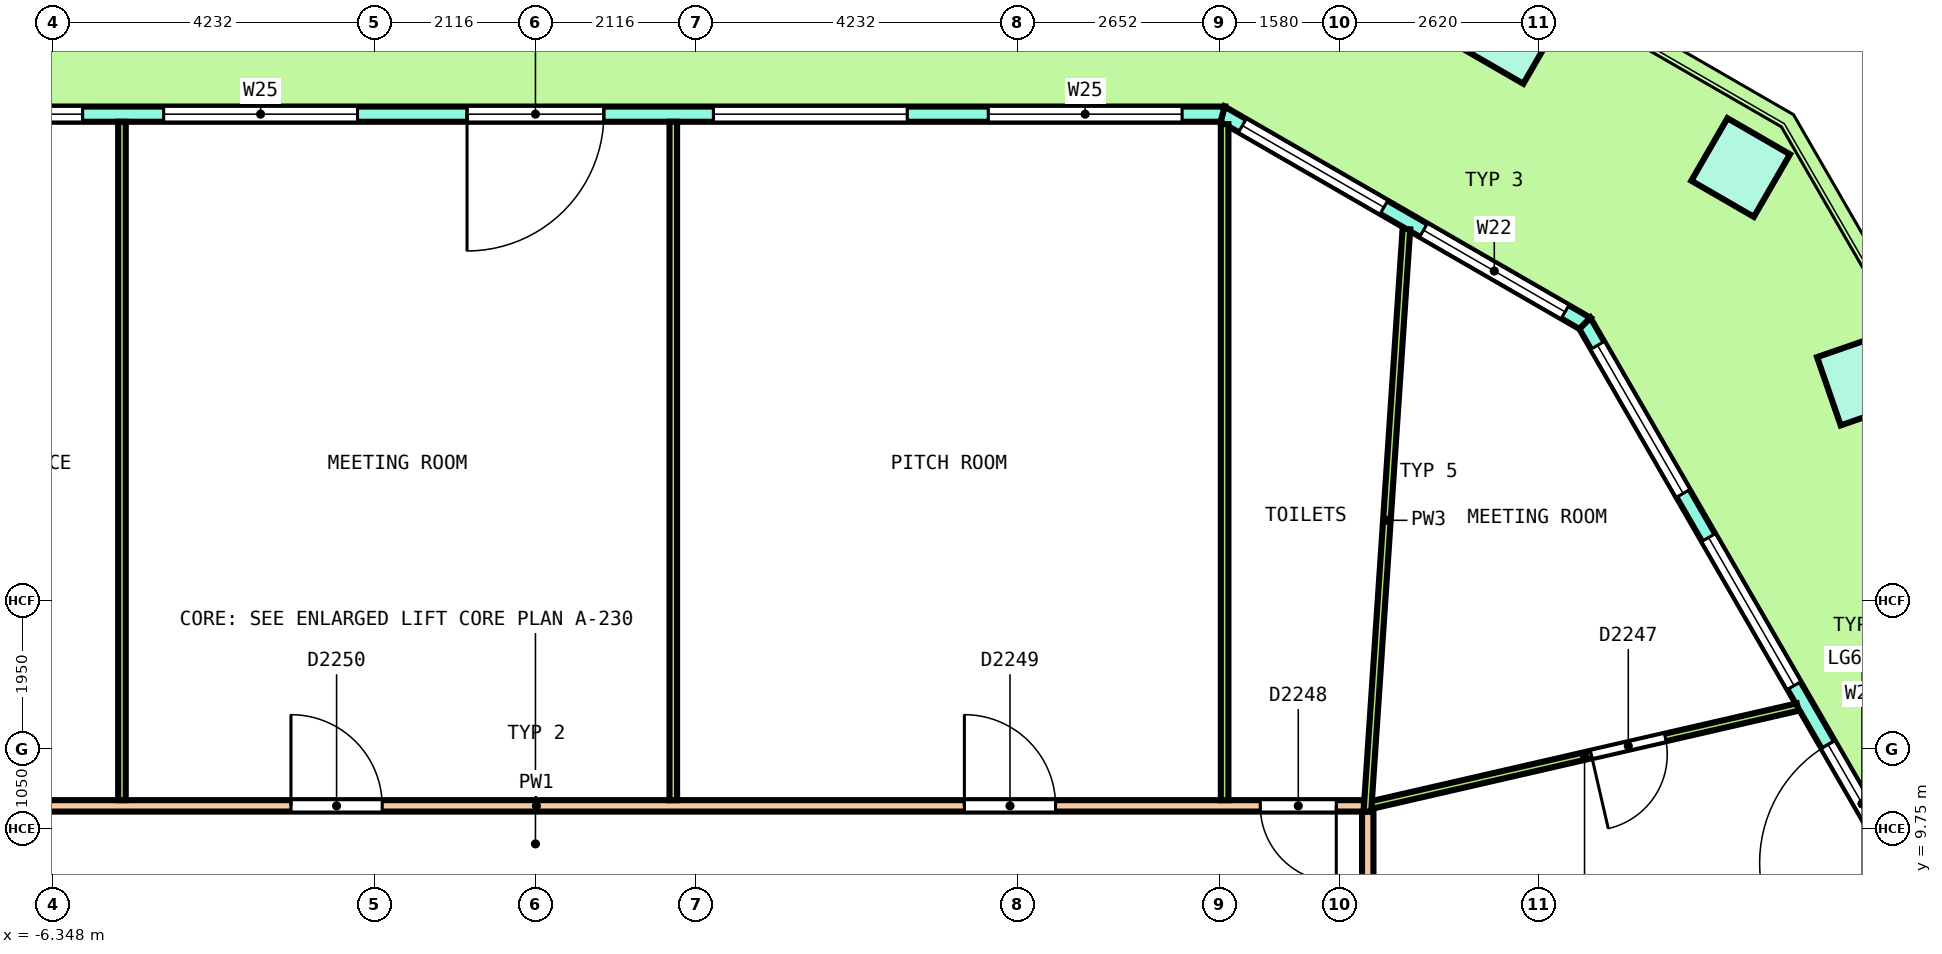
"""IFC4 building model, lengths in metres.
Left out: names, types, materials, properties, quantities, classifications, styles, units other than length and angle.
Written with IfcOpenShell. Run it as: python <this file> out.ifc"""

import sys

from ifc_helpers import new_model, si_unit, direction, frame, frame_2d, origin, origin_2d, place, context, subcontext, project, spatial, polyline, rectangle, outline, extrude, element, fill, save


model = new_model("IFC4")
c1 = context("Model", 3, precision=1e-05, world=origin(), true_north=direction((0.0, 1.0)))
c2 = subcontext(c1, "Body", "Model", "MODEL_VIEW")
j1 = project(units=[si_unit("LENGTHUNIT", "METRE"), si_unit("PLANEANGLEUNIT", "RADIAN")], contexts=[c1])
p1 = place(None, origin())
s1 = spatial("IfcSite", under=j1, at=p1, CompositionType="ELEMENT")
p2 = place(p1, origin())
s2 = spatial("IfcBuilding", under=s1, at=p2, CompositionType="ELEMENT")
p3 = place(p2, frame((0.0, 0.0, 295.0)))
s3 = spatial("IfcBuildingStorey", under=s2, at=p3, CompositionType="ELEMENT", Elevation=295.0)
p4 = place(p3, frame((17.466, 15.66, 0.0), z_axis=(0.032646772519, 0.006301430425, 0.999447087253), x_axis=(-0.500366215775, 0.865745428355, 0.010885926408)))
e1 = element("IfcColumn", 1, at=p4, inside=s3, PredefinedType="COLUMN", context=c2, shape_type="SweptSolid", body=[
    extrude(rectangle(XDim=0.95, YDim=0.95, at=origin_2d()), origin(), (0.0, 0.0, 1.0), 3.642),
])
for number, where, z_axis, x_axis in (
    (2, (15.856, 18.448, 0.0), (0.036, 0.0, 0.999), (-0.865, 0.5, 0.031)),
    (3, (12.823, 20.199, 0.0), (0.036, 0.0, 0.999), (-0.865, 0.5, 0.031)),
):
    element("IfcColumn", number, at=place(p3, frame(where, z_axis=z_axis, x_axis=x_axis)), inside=s3, PredefinedType="COLUMN", context=c2, shape_type="SweptSolid", body=[
        extrude(rectangle(XDim=0.95, YDim=0.95, at=origin_2d()), origin(), (0.0, 0.0, 1.0), 3.642),
    ])
p5 = place(p3, frame((21.104, 3.757, 0.0), z_axis=(0.0, 0.0, 1.0), x_axis=(-0.500006712695, 0.866021528173, 0.0)))
e4 = element("IfcWall", 4, at=p5, inside=s3, PredefinedType="SOLIDWALL", context=c2, shape_type="SweptSolid", body=[
    extrude(outline(polyline([(-0.027, -0.1), (1.02, -0.1), (2.066, -0.1), (3.113, -0.1), (4.159, -0.1), (5.205, -0.1), (6.252, -0.1), (7.298, -0.1), (8.345, -0.1), (9.391, -0.1), (10.438, -0.1), (11.484, -0.1), (12.531, -0.1), (13.577, -0.1), (14.623, -0.1), (14.57, 0.1), (13.531, 0.1), (12.492, 0.1), (11.453, 0.1), (10.415, 0.1), (9.376, 0.1), (8.337, 0.1), (7.298, 0.1), (6.26, 0.1), (5.221, 0.1), (4.182, 0.1), (3.143, 0.1), (2.104, 0.1), (1.066, 0.1), (0.027, 0.1), (-0.027, -0.1)])), origin(), (0.0, 0.0, 1.0), 3.7),
])
p6 = place(p5, frame((0.335, 0.0, 0.1)))
e5 = element("IfcOpeningElement", 5, at=p6, cuts=e4, PredefinedType="OPENING", context=c2, shape_type="SweptSolid", body=[
    extrude(rectangle(XDim=2.25, YDim=2.75, at=frame_2d((1.125, 1.375))), frame((0.0, 0.11, 0.0), z_axis=(0.0, -1.0, 0.0), x_axis=(1.0, 0.0, 0.0)), (0.0, 0.0, 1.0), 0.22),
])
p7 = place(p5, frame((3.254, 0.0, 0.1)))
e6 = element("IfcOpeningElement", 6, at=p7, cuts=e4, PredefinedType="OPENING", context=c2, shape_type="SweptSolid", body=[
    extrude(rectangle(XDim=2.25, YDim=2.75, at=frame_2d((1.125, 1.375))), frame((0.0, 0.11, 0.0), z_axis=(0.0, -1.0, 0.0), x_axis=(1.0, 0.0, 0.0)), (0.0, 0.0, 1.0), 0.22),
])
p8 = place(p5, frame((6.398, 0.0, 0.0)))
e7 = element("IfcOpeningElement", 7, at=p8, cuts=e4, PredefinedType="OPENING", context=c2, shape_type="SweptSolid", body=[
    extrude(rectangle(XDim=1.8, YDim=2.4, at=frame_2d((0.9, 1.2))), frame((0.0, 0.11, 0.0), z_axis=(0.0, -1.0, 0.0), x_axis=(1.0, 0.0, 0.0)), (0.0, 0.0, 1.0), 0.22),
])
p9 = place(p5, frame((6.398, 0.0, 2.55)))
e8 = element("IfcOpeningElement", 8, at=p9, cuts=e4, PredefinedType="OPENING", context=c2, shape_type="SweptSolid", body=[
    extrude(rectangle(XDim=1.8, YDim=0.3, at=frame_2d((0.9, 0.15))), frame((0.0, 0.11, 0.0), z_axis=(0.0, -1.0, 0.0), x_axis=(1.0, 0.0, 0.0)), (0.0, 0.0, 1.0), 0.22),
])
p10 = place(p5, frame((9.093, 0.0, 0.1)))
e9 = element("IfcOpeningElement", 9, at=p10, cuts=e4, PredefinedType="OPENING", context=c2, shape_type="SweptSolid", body=[
    extrude(rectangle(XDim=2.25, YDim=2.75, at=frame_2d((1.125, 1.375))), frame((0.0, 0.11, 0.0), z_axis=(0.0, -1.0, 0.0), x_axis=(1.0, 0.0, 0.0)), (0.0, 0.0, 1.0), 0.22),
])
p11 = place(p5, frame((12.012, 0.0, 0.1)))
e10 = element("IfcOpeningElement", 10, at=p11, cuts=e4, PredefinedType="OPENING", context=c2, shape_type="SweptSolid", body=[
    extrude(rectangle(XDim=2.25, YDim=2.75, at=frame_2d((1.125, 1.375))), frame((0.0, 0.11, 0.0), z_axis=(0.0, -1.0, 0.0), x_axis=(1.0, 0.0, 0.0)), (0.0, 0.0, 1.0), 0.22),
])
p12 = place(p3, frame((13.806, 16.398, 0.0), z_axis=(0.0, 0.0, 1.0), x_axis=(-0.866026017613, 0.499998936816, 0.0)))
e11 = element("IfcWall", 11, at=p12, inside=s3, PredefinedType="SOLIDWALL", context=c2, shape_type="SweptSolid", body=[
    extrude(outline(polyline([(-0.027, -0.1), (1.084, -0.1), (2.196, -0.1), (3.307, -0.1), (4.419, -0.1), (5.53, -0.1), (5.477, 0.1), (4.387, 0.1), (3.297, 0.1), (2.207, 0.1), (1.117, 0.1), (0.027, 0.1), (-0.027, -0.1)])), origin(), (0.0, 0.0, 1.0), 3.7),
])
p13 = place(p12, frame((0.301, 0.0, 0.1)))
e12 = element("IfcOpeningElement", 12, at=p13, cuts=e11, PredefinedType="OPENING", context=c2, shape_type="SweptSolid", body=[
    extrude(rectangle(XDim=2.15, YDim=2.75, at=frame_2d((1.075, 1.375))), frame((0.0, 0.11, 0.0), z_axis=(0.0, -1.0, 0.0), x_axis=(1.0, 0.0, 0.0)), (0.0, 0.0, 1.0), 0.22),
])
p14 = place(p12, frame((3.052, 0.0, 0.1)))
e13 = element("IfcOpeningElement", 13, at=p14, cuts=e11, PredefinedType="OPENING", context=c2, shape_type="SweptSolid", body=[
    extrude(rectangle(XDim=2.15, YDim=2.75, at=frame_2d((1.075, 1.375))), frame((0.0, 0.11, 0.0), z_axis=(0.0, -1.0, 0.0), x_axis=(1.0, 0.0, 0.0)), (0.0, 0.0, 1.0), 0.22),
])
p15 = place(p3, frame((9.04, 19.15, 0.0), z_axis=(0.0, 0.0, 1.0), x_axis=(-1.0, 0.0, 0.0)))
e14 = element("IfcWall", 14, at=p15, inside=s3, PredefinedType="SOLIDWALL", context=c2, shape_type="SweptSolid", body=[
    extrude(outline(polyline([(-0.027, -0.1), (0.98, -0.1), (1.988, -0.1), (2.995, -0.1), (4.003, -0.1), (5.01, -0.1), (6.018, -0.1), (7.025, -0.1), (8.033, -0.1), (9.04, -0.1), (10.047, -0.1), (11.055, -0.1), (12.062, -0.1), (13.07, -0.1), (14.077, -0.1), (15.085, -0.1), (16.092, -0.1), (17.1, -0.1), (18.107, -0.1), (18.053, 0.1), (17.052, 0.1), (16.05, 0.1), (15.049, 0.1), (14.047, 0.1), (13.046, 0.1), (12.044, 0.1), (11.043, 0.1), (10.042, 0.1), (9.04, 0.1), (8.039, 0.1), (7.037, 0.1), (6.036, 0.1), (5.034, 0.1), (4.033, 0.1), (3.031, 0.1), (2.03, 0.1), (1.028, 0.1), (0.027, 0.1), (-0.027, -0.1)])), origin(), (0.0, 0.0, 1.0), 3.7),
])
p16 = place(p15, frame((0.533, 0.0, 0.1)))
e15 = element("IfcOpeningElement", 15, at=p16, cuts=e14, PredefinedType="OPENING", context=c2, shape_type="SweptSolid", body=[
    extrude(rectangle(XDim=2.55, YDim=2.75, at=frame_2d((1.275, 1.375))), frame((0.0, 0.11, 0.0), z_axis=(0.0, -1.0, 0.0), x_axis=(1.0, 0.0, 0.0)), (0.0, 0.0, 1.0), 0.22),
])
p17 = place(p15, frame((4.149, 0.0, 0.1)))
e16 = element("IfcOpeningElement", 16, at=p17, cuts=e14, PredefinedType="OPENING", context=c2, shape_type="SweptSolid", body=[
    extrude(rectangle(XDim=2.55, YDim=2.75, at=frame_2d((1.275, 1.375))), frame((0.0, 0.11, 0.0), z_axis=(0.0, -1.0, 0.0), x_axis=(1.0, 0.0, 0.0)), (0.0, 0.0, 1.0), 0.22),
])
p18 = place(p15, frame((8.14, 0.0, 0.0)))
e17 = element("IfcOpeningElement", 17, at=p18, cuts=e14, PredefinedType="OPENING", context=c2, shape_type="SweptSolid", body=[
    extrude(rectangle(XDim=1.8, YDim=2.4, at=frame_2d((0.9, 1.2))), frame((0.0, 0.11, 0.0), z_axis=(0.0, -1.0, 0.0), x_axis=(1.0, 0.0, 0.0)), (0.0, 0.0, 1.0), 0.22),
])
p19 = place(p15, frame((8.14, 0.0, 2.55)))
e18 = element("IfcOpeningElement", 18, at=p19, cuts=e14, PredefinedType="OPENING", context=c2, shape_type="SweptSolid", body=[
    extrude(rectangle(XDim=1.8, YDim=0.3, at=frame_2d((0.9, 0.15))), frame((0.0, 0.11, 0.0), z_axis=(0.0, -1.0, 0.0), x_axis=(1.0, 0.0, 0.0)), (0.0, 0.0, 1.0), 0.22),
])
p20 = place(p15, frame((11.381, 0.0, 0.1)))
e19 = element("IfcOpeningElement", 19, at=p20, cuts=e14, PredefinedType="OPENING", context=c2, shape_type="SweptSolid", body=[
    extrude(rectangle(XDim=2.55, YDim=2.75, at=frame_2d((1.275, 1.375))), frame((0.0, 0.11, 0.0), z_axis=(0.0, -1.0, 0.0), x_axis=(1.0, 0.0, 0.0)), (0.0, 0.0, 1.0), 0.22),
])
p21 = place(p15, frame((14.997, 0.0, 0.1)))
e20 = element("IfcOpeningElement", 20, at=p21, cuts=e14, PredefinedType="OPENING", context=c2, shape_type="SweptSolid", body=[
    extrude(rectangle(XDim=2.55, YDim=2.75, at=frame_2d((1.275, 1.375))), frame((0.0, 0.11, 0.0), z_axis=(0.0, -1.0, 0.0), x_axis=(1.0, 0.0, 0.0)), (0.0, 0.0, 1.0), 0.22),
])
p22 = place(p3, frame((10.95, -7.025, 0.0), z_axis=(0.0, 0.0, 1.0), x_axis=(0.0, 1.0, 0.0)))
e21 = element("IfcWall", 21, at=p22, inside=s3, PredefinedType="PARTITIONING", context=c2, shape_type="SweptSolid", body=[
    extrude(rectangle(XDim=17.0, YDim=0.15, at=frame_2d((8.5, 0.0))), origin(), (0.0, 0.0, 1.0), 2.9),
])
p23 = place(p22, frame((8.758, 0.0, 0.0)))
e22 = element("IfcOpeningElement", 22, at=p23, cuts=e21, PredefinedType="OPENING", context=c2, shape_type="SweptSolid", body=[
    extrude(rectangle(XDim=1.0, YDim=2.1, at=frame_2d((0.5, 1.05))), frame((0.0, 0.085, 0.0), z_axis=(0.0, -1.0, 0.0), x_axis=(1.0, 0.0, 0.0)), (0.0, 0.0, 1.0), 0.17),
])
p24 = place(p22, frame((12.687, 0.0, 0.0)))
e23 = element("IfcOpeningElement", 23, at=p24, cuts=e21, PredefinedType="OPENING", context=c2, shape_type="SweptSolid", body=[
    extrude(rectangle(XDim=1.2, YDim=2.1, at=frame_2d((0.6, 1.05))), frame((0.0, 0.085, 0.0), z_axis=(0.0, -1.0, 0.0), x_axis=(1.0, 0.0, 0.0)), (0.0, 0.0, 1.0), 0.17),
])
p25 = place(p22, frame((2.822, 0.0, 0.0)))
e24 = element("IfcOpeningElement", 24, at=p25, cuts=e21, PredefinedType="OPENING", context=c2, shape_type="SweptSolid", body=[
    extrude(rectangle(XDim=1.0, YDim=2.1, at=frame_2d((0.5, 1.05))), frame((0.0, 0.085, 0.0), z_axis=(0.0, -1.0, 0.0), x_axis=(1.0, 0.0, 0.0)), (0.0, 0.0, 1.0), 0.17),
])
p26 = place(p22, frame((5.979, 0.0, 0.0)))
e25 = element("IfcOpeningElement", 25, at=p26, cuts=e21, PredefinedType="OPENING", context=c2, shape_type="SweptSolid", body=[
    extrude(rectangle(XDim=1.0, YDim=2.1, at=frame_2d((0.5, 1.05))), frame((0.0, 0.085, 0.0), z_axis=(0.0, -1.0, 0.0), x_axis=(1.0, 0.0, 0.0)), (0.0, 0.0, 1.0), 0.17),
])
p27 = place(p3, frame((-10.875, 10.05, 0.0), z_axis=(0.0, 0.0, 1.0), x_axis=(1.0, 0.0, 0.0)))
e26 = element("IfcWall", 26, at=p27, inside=s3, PredefinedType="PARTITIONING", context=c2, shape_type="SweptSolid", body=[
    extrude(rectangle(XDim=21.775, YDim=0.15, at=frame_2d((10.887, 0.0))), origin(), (0.0, 0.0, 1.0), 2.9),
])
p28 = place(p27, frame((20.411, 0.0, 0.0)))
e27 = element("IfcOpeningElement", 27, at=p28, cuts=e26, PredefinedType="OPENING", context=c2, shape_type="SweptSolid", body=[
    extrude(rectangle(XDim=1.0, YDim=2.1, at=frame_2d((0.5, 1.05))), frame((0.0, 0.085, 0.0), z_axis=(0.0, -1.0, 0.0), x_axis=(1.0, 0.0, 0.0)), (0.0, 0.0, 1.0), 0.17),
])
p29 = place(p27, frame((16.518, 0.0, 0.0)))
e28 = element("IfcOpeningElement", 28, at=p29, cuts=e26, PredefinedType="OPENING", context=c2, shape_type="SweptSolid", body=[
    extrude(rectangle(XDim=1.2, YDim=2.1, at=frame_2d((0.6, 1.05))), frame((0.0, 0.085, 0.0), z_axis=(0.0, -1.0, 0.0), x_axis=(1.0, 0.0, 0.0)), (0.0, 0.0, 1.0), 0.17),
])
p30 = place(p27, frame((7.659, 0.0, 0.0)))
e29 = element("IfcOpeningElement", 29, at=p30, cuts=e26, PredefinedType="OPENING", context=c2, shape_type="SweptSolid", body=[
    extrude(rectangle(XDim=1.2, YDim=2.1, at=frame_2d((0.6, 1.05))), frame((0.0, 0.085, 0.0), z_axis=(0.0, -1.0, 0.0), x_axis=(1.0, 0.0, 0.0)), (0.0, 0.0, 1.0), 0.17),
])
p31 = place(p27, frame((2.64, 0.0, 0.0)))
e30 = element("IfcOpeningElement", 30, at=p31, cuts=e26, PredefinedType="OPENING", context=c2, shape_type="SweptSolid", body=[
    extrude(rectangle(XDim=1.0, YDim=2.1, at=frame_2d((0.5, 1.05))), frame((0.0, 0.085, 0.0), z_axis=(0.0, -1.0, 0.0), x_axis=(1.0, 0.0, 0.0)), (0.0, 0.0, 1.0), 0.17),
])
p32 = place(p3, frame((10.999, 10.061, 0.0), z_axis=(0.0, 0.0, 1.0), x_axis=(0.974601054953, 0.22394817187, 0.0)))
e31 = element("IfcWall", 31, at=p32, inside=s3, PredefinedType="PARTITIONING", context=c2, shape_type="SweptSolid", body=[
    extrude(rectangle(XDim=5.753, YDim=0.1, at=frame_2d((2.876, 0.0))), origin(), (0.0, 0.0, 1.0), 2.9),
])
p33 = place(p32, frame((2.967, 0.0, 0.0)))
e32 = element("IfcOpeningElement", 32, at=p33, cuts=e31, PredefinedType="OPENING", context=c2, shape_type="SweptSolid", body=[
    extrude(rectangle(XDim=1.0, YDim=2.1, at=frame_2d((0.5, 1.05))), frame((0.0, 0.06, 0.0), z_axis=(0.0, -1.0, 0.0), x_axis=(1.0, 0.0, 0.0)), (0.0, 0.0, 1.0), 0.12),
])
p34 = place(p3, frame((10.945, 9.975, 0.0), z_axis=(0.0, 0.0, 1.0), x_axis=(0.066816484189, 0.997765281737, 0.0)))
e33 = element("IfcWall", 33, at=p34, inside=s3, PredefinedType="PARTITIONING", context=c2, shape_type="SweptSolid", body=[
    extrude(rectangle(XDim=7.68, YDim=0.1, at=frame_2d((3.84, 0.0))), origin(), (0.0, 0.0, 1.0), 2.9),
])
p35 = place(p3, frame((9.067, 10.125, 0.0), z_axis=(0.0, 0.0, 1.0), x_axis=(0.0, 1.0, 0.0)))
e34 = element("IfcWall", 34, at=p35, inside=s3, PredefinedType="PARTITIONING", context=c2, shape_type="SweptSolid", body=[
    extrude(rectangle(XDim=8.894, YDim=0.1, at=frame_2d((4.447, 0.0))), origin(), (0.0, 0.0, 1.0), 2.9),
])
for number, where, z_axis, x_axis in (
    (35, (1.813, 10.125, 0.0), (0.0, 0.0, 1.0), (0.0, 1.0, 0.0)),
    (36, (-5.44, 10.125, 0.0), (0.0, 0.0, 1.0), (0.0, 1.0, 0.0)),
):
    element("IfcWall", number, at=place(p3, frame(where, z_axis=z_axis, x_axis=x_axis)), inside=s3, PredefinedType="PARTITIONING", context=c2, shape_type="SweptSolid", body=[
        extrude(rectangle(XDim=8.925, YDim=0.1, at=frame_2d((4.462, 0.0))), origin(), (0.0, 0.0, 1.0), 2.9),
    ])
p36 = place(p8, origin())
e37 = element("IfcDoor", 37, at=p36, inside=s3, OperationType="DOUBLE_DOOR_SINGLE_SWING", PredefinedType="DOOR", context=c2, shape_type="SweptSolid", body=[
    extrude(rectangle(XDim=1.8, YDim=2.4, at=frame_2d((0.9, 1.2))), frame((0.0, 0.025, 0.0), z_axis=(0.0, -1.0, 0.0), x_axis=(1.0, 0.0, 0.0)), (0.0, 0.0, 1.0), 0.05),
])
fill(e7, e37)
p37 = place(p9, origin())
e38 = element("IfcWindow", 38, at=p37, inside=s3, PartitioningType="SINGLE_PANEL", PredefinedType="WINDOW", context=c2, shape_type="SweptSolid", body=[
    extrude(rectangle(XDim=1.8, YDim=0.3, at=frame_2d((0.9, 0.15))), frame((0.0, 0.03, 0.0), z_axis=(0.0, -1.0, 0.0), x_axis=(1.0, 0.0, 0.0)), (0.0, 0.0, 1.0), 0.06),
])
fill(e8, e38)
p38 = place(p10, origin())
e39 = element("IfcWindow", 39, at=p38, inside=s3, PartitioningType="SINGLE_PANEL", PredefinedType="WINDOW", context=c2, shape_type="SweptSolid", body=[
    extrude(rectangle(XDim=2.25, YDim=2.75, at=frame_2d((1.125, 1.375))), frame((0.0, 0.03, 0.0), z_axis=(0.0, -1.0, 0.0), x_axis=(1.0, 0.0, 0.0)), (0.0, 0.0, 1.0), 0.06),
])
fill(e9, e39)
p39 = place(p11, origin())
e40 = element("IfcWindow", 40, at=p39, inside=s3, PartitioningType="SINGLE_PANEL", PredefinedType="WINDOW", context=c2, shape_type="SweptSolid", body=[
    extrude(rectangle(XDim=2.25, YDim=2.75, at=frame_2d((1.125, 1.375))), frame((0.0, 0.03, 0.0), z_axis=(0.0, -1.0, 0.0), x_axis=(1.0, 0.0, 0.0)), (0.0, 0.0, 1.0), 0.06),
])
fill(e10, e40)
p40 = place(p13, origin())
e41 = element("IfcWindow", 41, at=p40, inside=s3, PartitioningType="SINGLE_PANEL", PredefinedType="WINDOW", context=c2, shape_type="SweptSolid", body=[
    extrude(rectangle(XDim=2.15, YDim=2.75, at=frame_2d((1.075, 1.375))), frame((0.0, 0.03, 0.0), z_axis=(0.0, -1.0, 0.0), x_axis=(1.0, 0.0, 0.0)), (0.0, 0.0, 1.0), 0.06),
])
fill(e12, e41)
p41 = place(p14, origin())
e42 = element("IfcWindow", 42, at=p41, inside=s3, PartitioningType="SINGLE_PANEL", PredefinedType="WINDOW", context=c2, shape_type="SweptSolid", body=[
    extrude(rectangle(XDim=2.15, YDim=2.75, at=frame_2d((1.075, 1.375))), frame((0.0, 0.03, 0.0), z_axis=(0.0, -1.0, 0.0), x_axis=(1.0, 0.0, 0.0)), (0.0, 0.0, 1.0), 0.06),
])
fill(e13, e42)
p42 = place(p16, origin())
e43 = element("IfcWindow", 43, at=p42, inside=s3, PartitioningType="SINGLE_PANEL", PredefinedType="WINDOW", context=c2, shape_type="SweptSolid", body=[
    extrude(rectangle(XDim=2.55, YDim=2.75, at=frame_2d((1.275, 1.375))), frame((0.0, 0.03, 0.0), z_axis=(0.0, -1.0, 0.0), x_axis=(1.0, 0.0, 0.0)), (0.0, 0.0, 1.0), 0.06),
])
fill(e15, e43)
p43 = place(p17, origin())
e44 = element("IfcWindow", 44, at=p43, inside=s3, PartitioningType="SINGLE_PANEL", PredefinedType="WINDOW", context=c2, shape_type="SweptSolid", body=[
    extrude(rectangle(XDim=2.55, YDim=2.75, at=frame_2d((1.275, 1.375))), frame((0.0, 0.03, 0.0), z_axis=(0.0, -1.0, 0.0), x_axis=(1.0, 0.0, 0.0)), (0.0, 0.0, 1.0), 0.06),
])
fill(e16, e44)
p44 = place(p18, origin())
e45 = element("IfcDoor", 45, at=p44, inside=s3, OperationType="DOUBLE_DOOR_SINGLE_SWING", PredefinedType="DOOR", context=c2, shape_type="SweptSolid", body=[
    extrude(rectangle(XDim=1.8, YDim=2.4, at=frame_2d((0.9, 1.2))), frame((0.0, 0.025, 0.0), z_axis=(0.0, -1.0, 0.0), x_axis=(1.0, 0.0, 0.0)), (0.0, 0.0, 1.0), 0.05),
])
fill(e17, e45)
p45 = place(p19, origin())
e46 = element("IfcWindow", 46, at=p45, inside=s3, PartitioningType="SINGLE_PANEL", PredefinedType="WINDOW", context=c2, shape_type="SweptSolid", body=[
    extrude(rectangle(XDim=1.8, YDim=0.3, at=frame_2d((0.9, 0.15))), frame((0.0, 0.03, 0.0), z_axis=(0.0, -1.0, 0.0), x_axis=(1.0, 0.0, 0.0)), (0.0, 0.0, 1.0), 0.06),
])
fill(e18, e46)
p46 = place(p20, origin())
e47 = element("IfcWindow", 47, at=p46, inside=s3, PartitioningType="SINGLE_PANEL", PredefinedType="WINDOW", context=c2, shape_type="SweptSolid", body=[
    extrude(rectangle(XDim=2.55, YDim=2.75, at=frame_2d((1.275, 1.375))), frame((0.0, 0.03, 0.0), z_axis=(0.0, -1.0, 0.0), x_axis=(1.0, 0.0, 0.0)), (0.0, 0.0, 1.0), 0.06),
])
fill(e19, e47)
p47 = place(p21, origin())
e48 = element("IfcWindow", 48, at=p47, inside=s3, PartitioningType="SINGLE_PANEL", PredefinedType="WINDOW", context=c2, shape_type="SweptSolid", body=[
    extrude(rectangle(XDim=2.55, YDim=2.75, at=frame_2d((1.275, 1.375))), frame((0.0, 0.03, 0.0), z_axis=(0.0, -1.0, 0.0), x_axis=(1.0, 0.0, 0.0)), (0.0, 0.0, 1.0), 0.06),
])
fill(e20, e48)
p48 = place(p33, origin())
e49 = element("IfcDoor", 49, at=p48, inside=s3, OperationType="SINGLE_SWING_LEFT", PredefinedType="DOOR", context=c2, shape_type="SweptSolid", body=[
    extrude(rectangle(XDim=1.0, YDim=2.1, at=frame_2d((0.5, 1.05))), frame((0.0, 0.025, 0.0), z_axis=(0.0, -1.0, 0.0), x_axis=(1.0, 0.0, 0.0)), (0.0, 0.0, 1.0), 0.05),
])
fill(e32, e49)
p49 = place(p28, origin())
e50 = element("IfcDoor", 50, at=p49, inside=s3, OperationType="SINGLE_SWING_RIGHT", PredefinedType="DOOR", context=c2, shape_type="SweptSolid", body=[
    extrude(rectangle(XDim=1.0, YDim=2.1, at=frame_2d((0.5, 1.05))), frame((0.0, 0.025, 0.0), z_axis=(0.0, -1.0, 0.0), x_axis=(1.0, 0.0, 0.0)), (0.0, 0.0, 1.0), 0.05),
])
fill(e27, e50)
p50 = place(p29, origin())
e51 = element("IfcDoor", 51, at=p50, inside=s3, OperationType="DOUBLE_DOOR_SINGLE_SWING", PredefinedType="DOOR", context=c2, shape_type="SweptSolid", body=[
    extrude(rectangle(XDim=1.2, YDim=2.1, at=frame_2d((0.6, 1.05))), frame((0.0, 0.025, 0.0), z_axis=(0.0, -1.0, 0.0), x_axis=(1.0, 0.0, 0.0)), (0.0, 0.0, 1.0), 0.05),
])
fill(e28, e51)
p51 = place(p30, origin())
e52 = element("IfcDoor", 52, at=p51, inside=s3, OperationType="DOUBLE_DOOR_SINGLE_SWING", PredefinedType="DOOR", context=c2, shape_type="SweptSolid", body=[
    extrude(rectangle(XDim=1.2, YDim=2.1, at=frame_2d((0.6, 1.05))), frame((0.0, 0.025, 0.0), z_axis=(0.0, -1.0, 0.0), x_axis=(1.0, 0.0, 0.0)), (0.0, 0.0, 1.0), 0.05),
])
fill(e29, e52)
save(model, sys.argv[1])
